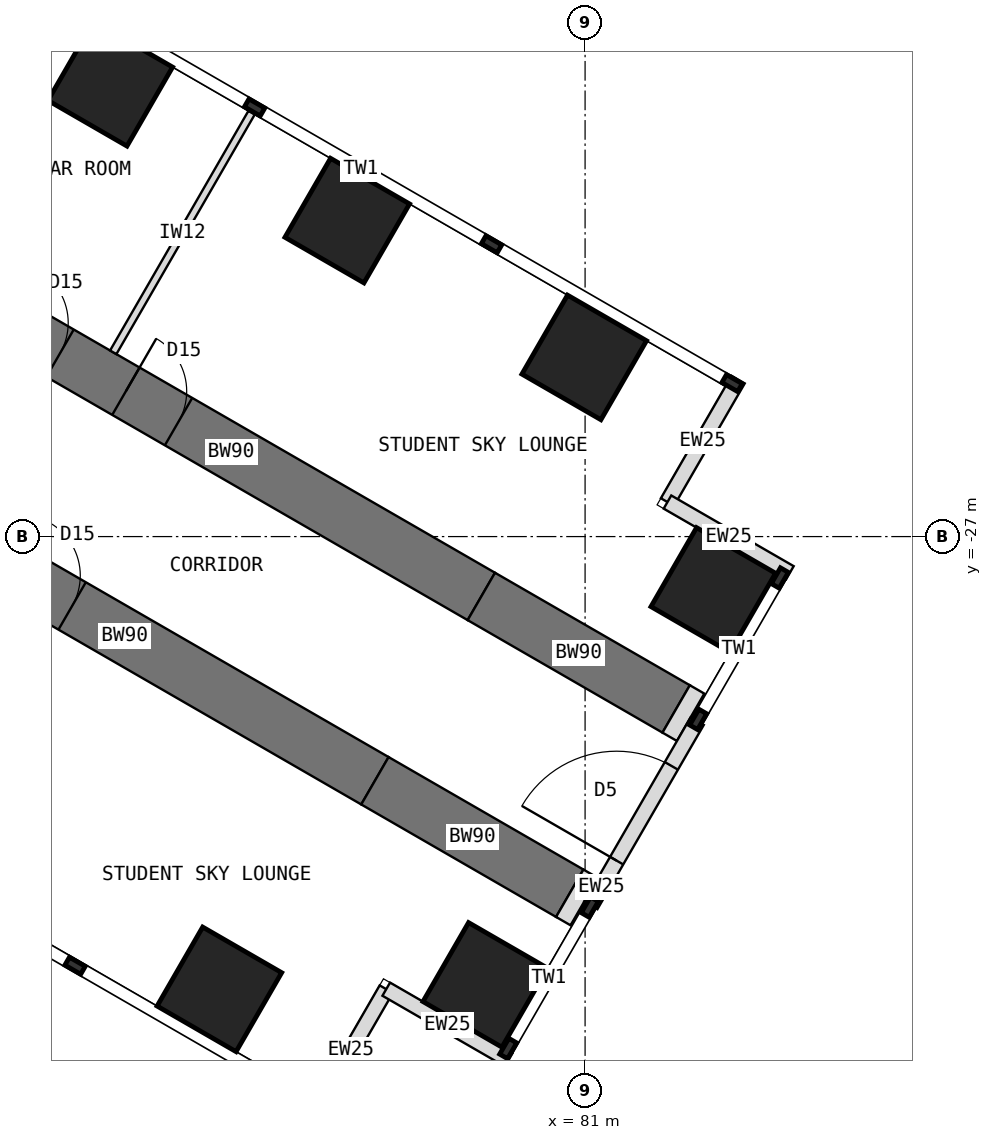
"""IFC4 building model, lengths in metres.
Left out: names, types, materials, properties, quantities, classifications, styles, units other than length and angle.
Written with IfcOpenShell. Run it as: python <this file> out.ifc"""

import sys

from ifc_helpers import new_model, si_unit, direction, frame, frame_2d, origin, origin_2d, place, context, subcontext, project, spatial, rectangle, extrude, element, fill, save


model = new_model("IFC4")
c1 = context("Model", 3, precision=1e-05, world=origin(), true_north=direction((0.0, 1.0)))
c2 = subcontext(c1, "Body", "Model", "MODEL_VIEW")
j1 = project(units=[si_unit("LENGTHUNIT", "METRE"), si_unit("PLANEANGLEUNIT", "RADIAN")], contexts=[c1])
p1 = place(None, origin())
s1 = spatial("IfcSite", under=j1, at=p1, CompositionType="ELEMENT")
p2 = place(p1, origin())
s2 = spatial("IfcBuilding", under=s1, at=p2, CompositionType="ELEMENT")
p3 = place(p2, frame((0.0, 0.0, 20.5)))
s3 = spatial("IfcBuildingStorey", under=s2, at=p3, CompositionType="ELEMENT", Elevation=20.5)
p4 = place(p3, frame((71.066, -23.234, 0.0), z_axis=(0.0, 0.0, 1.0), x_axis=(0.86602681393, -0.499997557548, 0.0)))
e1 = element("IfcWall", 1, at=p4, inside=s3, PredefinedType="SHEAR", context=c2, shape_type="SweptSolid", body=[
    extrude(rectangle(XDim=9.5, YDim=0.9, at=frame_2d((4.75, 0.0))), origin(), (0.0, 0.0, 1.0), 4.0),
])
p5 = place(p4, frame((0.5, 0.0, 0.0)))
e2 = element("IfcOpeningElement", 2, at=p5, cuts=e1, PredefinedType="OPENING", context=c2, shape_type="SweptSolid", body=[
    extrude(rectangle(XDim=1.0, YDim=2.1, at=frame_2d((0.5, 1.05))), frame((0.0, 0.46, 0.0), z_axis=(0.0, -1.0, 0.0), x_axis=(1.0, 0.0, 0.0)), (0.0, 0.0, 1.0), 0.92),
])
p6 = place(p4, frame((2.75, 0.0, 0.0)))
e3 = element("IfcOpeningElement", 3, at=p6, cuts=e1, PredefinedType="OPENING", context=c2, shape_type="SweptSolid", body=[
    extrude(rectangle(XDim=1.0, YDim=2.1, at=frame_2d((0.5, 1.05))), frame((0.0, 0.46, 0.0), z_axis=(0.0, -1.0, 0.0), x_axis=(1.0, 0.0, 0.0)), (0.0, 0.0, 1.0), 0.92),
])
p7 = place(p3, frame((79.294, -27.984, 0.0), z_axis=(0.0, 0.0, 1.0), x_axis=(0.866000971088, -0.500042316284, 0.0)))
e4 = element("IfcWall", 4, at=p7, inside=s3, PredefinedType="SHEAR", context=c2, shape_type="SweptSolid", body=[
    extrude(rectangle(XDim=3.7, YDim=0.9, at=frame_2d((1.85, 0.0))), origin(), (0.0, 0.0, 1.0), 4.0),
])
p8 = place(p3, frame((69.316, -26.266, 0.0), z_axis=(0.0, 0.0, 1.0), x_axis=(0.86602681393, -0.499997557548, 0.0)))
e5 = element("IfcWall", 5, at=p8, inside=s3, PredefinedType="SHEAR", context=c2, shape_type="SweptSolid", body=[
    extrude(rectangle(XDim=9.5, YDim=0.9, at=frame_2d((4.75, 0.0))), origin(), (0.0, 0.0, 1.0), 4.0),
])
p9 = place(p8, frame((0.5, 0.0, 0.0)))
e6 = element("IfcOpeningElement", 6, at=p9, cuts=e5, PredefinedType="OPENING", context=c2, shape_type="SweptSolid", body=[
    extrude(rectangle(XDim=1.0, YDim=2.1, at=frame_2d((0.5, 1.05))), frame((0.0, 0.46, 0.0), z_axis=(0.0, -1.0, 0.0), x_axis=(1.0, 0.0, 0.0)), (0.0, 0.0, 1.0), 0.92),
])
p10 = place(p8, frame((2.75, 0.0, 0.0)))
e7 = element("IfcOpeningElement", 7, at=p10, cuts=e5, PredefinedType="OPENING", context=c2, shape_type="SweptSolid", body=[
    extrude(rectangle(XDim=1.0, YDim=2.1, at=frame_2d((0.5, 1.05))), frame((0.0, 0.46, 0.0), z_axis=(0.0, -1.0, 0.0), x_axis=(1.0, 0.0, 0.0)), (0.0, 0.0, 1.0), 0.92),
])
p11 = place(p3, frame((77.544, -31.016, 0.0), z_axis=(0.0, 0.0, 1.0), x_axis=(0.866029545028, -0.499992827086, 0.0)))
e8 = element("IfcWall", 8, at=p11, inside=s3, PredefinedType="SHEAR", context=c2, shape_type="SweptSolid", body=[
    extrude(rectangle(XDim=3.7, YDim=0.9, at=frame_2d((1.85, 0.0))), origin(), (0.0, 0.0, 1.0), 4.0),
])
for number, where, z_axis, x_axis in (
    (9, (73.191, -19.554, 0.0), (0.0, 0.0, 1.0), (0.5, 0.866, 0.0)),
    (10, (77.088, -21.804, 0.0), (0.0, 0.0, 1.0), (0.5, 0.866, 0.0)),
    (11, (80.986, -24.054, 0.0), (0.0, 0.0, 1.0), (0.5, 0.866, 0.0)),
    (12, (74.986, -34.446, 0.0), (0.0, 0.0, 1.0), (0.5, 0.866, 0.0)),
    (13, (83.108, -27.877, 0.0), (0.0, 0.0, 1.0), (0.5, 0.866, 0.0)),
    (14, (79.358, -34.373, 0.0), (0.0, 0.0, 1.0), (0.5, 0.866, 0.0)),
):
    element("IfcColumn", number, at=place(p3, frame(where, z_axis=z_axis, x_axis=x_axis)), inside=s3, PredefinedType="COLUMN", context=c2, shape_type="SweptSolid", body=[
        extrude(rectangle(XDim=1.5, YDim=1.5, at=origin_2d()), origin(), (0.0, 0.0, 1.0), 4.0),
    ])
for number, where, z_axis, x_axis in (
    (15, (83.517, -24.419, 0.0), (0.0, 0.0, 1.0), (-0.5, -0.866, 0.0)),
    (16, (82.355, -26.432, 0.0), (0.0, 0.0, 1.0), (0.866, -0.5, 0.0)),
    (17, (76.567, -36.456, 0.0), (0.0, 0.0, 1.0), (0.5, 0.866, 0.0)),
    (18, (77.73, -34.443, 0.0), (0.0, 0.0, 1.0), (0.866, -0.5, 0.0)),
):
    element("IfcWall", number, at=place(p3, frame(where, z_axis=z_axis, x_axis=x_axis)), inside=s3, PredefinedType="STANDARD", context=c2, shape_type="SweptSolid", body=[
        extrude(rectangle(XDim=2.325, YDim=0.25, at=frame_2d((1.163, 0.0))), origin(), (0.0, 0.0, 1.0), 3.8),
    ])
p12 = place(p3, frame((81.094, -33.065, 0.0), z_axis=(0.0, 0.0, 1.0), x_axis=(0.500010275428, 0.866019471182, 0.0)))
e19 = element("IfcWall", 19, at=p12, inside=s3, PredefinedType="STANDARD", context=c2, shape_type="SweptSolid", body=[
    extrude(rectangle(XDim=3.5, YDim=0.25, at=frame_2d((1.75, 0.0))), origin(), (0.0, 0.0, 1.0), 3.8),
])
p13 = place(p12, frame((0.85, 0.0, 0.0)))
e20 = element("IfcOpeningElement", 20, at=p13, cuts=e19, PredefinedType="OPENING", context=c2, shape_type="SweptSolid", body=[
    extrude(rectangle(XDim=1.8, YDim=2.4, at=frame_2d((0.9, 1.2))), frame((0.0, 0.135, 0.0), z_axis=(0.0, -1.0, 0.0), x_axis=(1.0, 0.0, 0.0)), (0.0, 0.0, 1.0), 0.27),
])
for number, where, z_axis, x_axis in (
    (21, (82.498, -29.834, 0.0), (0.0, 0.0, 1.0), (0.866, -0.5, 0.0)),
    (22, (80.748, -32.865, 0.0), (0.0, 0.0, 1.0), (0.866, -0.5, 0.0)),
):
    element("IfcWall", number, at=place(p3, frame(where, z_axis=z_axis, x_axis=x_axis)), inside=s3, PredefinedType="PARTITIONING", context=c2, shape_type="SweptSolid", body=[
        extrude(rectangle(XDim=0.275, YDim=0.9, at=frame_2d((0.138, 0.0))), origin(), (0.0, 0.0, 1.0), 3.8),
    ])
p14 = place(p3, frame((73.24, -23.97, 0.0), z_axis=(0.0, 0.0, 1.0), x_axis=(0.499982560684, 0.866035472144, 0.0)))
e23 = element("IfcWall", 23, at=p14, inside=s3, PredefinedType="PARTITIONING", context=c2, shape_type="SweptSolid", body=[
    extrude(rectangle(XDim=4.55, YDim=0.12, at=frame_2d((2.275, 0.0))), origin(), (0.0, 0.0, 1.0), 3.8),
])
p15 = place(p13, origin())
e24 = element("IfcDoor", 24, at=p15, inside=s3, OperationType="DOUBLE_DOOR_DOUBLE_SWING", PredefinedType="DOOR", context=c2, shape_type="SweptSolid", body=[
    extrude(rectangle(XDim=1.8, YDim=2.4, at=frame_2d((0.9, 1.2))), frame((0.0, 0.025, 0.0), z_axis=(0.0, -1.0, 0.0), x_axis=(1.0, 0.0, 0.0)), (0.0, 0.0, 1.0), 0.05),
])
fill(e20, e24)
p16 = place(p5, origin())
e25 = element("IfcDoor", 25, at=p16, inside=s3, OperationType="SINGLE_SWING_LEFT", PredefinedType="DOOR", context=c2, shape_type="SweptSolid", body=[
    extrude(rectangle(XDim=0.92, YDim=2.06, at=frame_2d((0.5, 1.03))), frame((0.0, 0.025, 0.0), z_axis=(0.0, -1.0, 0.0), x_axis=(1.0, 0.0, 0.0)), (0.0, 0.0, 1.0), 0.05),
    extrude(rectangle(XDim=0.04, YDim=2.1, at=frame_2d((0.02, 1.05))), frame((0.0, 0.45, 0.0), z_axis=(0.0, -1.0, 0.0), x_axis=(1.0, 0.0, 0.0)), (0.0, 0.0, 1.0), 0.899),
    extrude(rectangle(XDim=0.04, YDim=2.1, at=frame_2d((0.98, 1.05))), frame((0.0, 0.45, 0.0), z_axis=(0.0, -1.0, 0.0), x_axis=(1.0, 0.0, 0.0)), (0.0, 0.0, 1.0), 0.899),
    extrude(rectangle(XDim=0.92, YDim=0.04, at=frame_2d((0.5, 2.08))), frame((0.0, 0.45, 0.0), z_axis=(0.0, -1.0, 0.0), x_axis=(1.0, 0.0, 0.0)), (0.0, 0.0, 1.0), 0.899),
])
fill(e2, e25)
p17 = place(p6, origin())
e26 = element("IfcDoor", 26, at=p17, inside=s3, OperationType="SINGLE_SWING_LEFT", PredefinedType="DOOR", context=c2, shape_type="SweptSolid", body=[
    extrude(rectangle(XDim=0.92, YDim=2.06, at=frame_2d((0.5, 1.03))), frame((0.0, 0.025, 0.0), z_axis=(0.0, -1.0, 0.0), x_axis=(1.0, 0.0, 0.0)), (0.0, 0.0, 1.0), 0.05),
    extrude(rectangle(XDim=0.04, YDim=2.1, at=frame_2d((0.02, 1.05))), frame((0.0, 0.45, 0.0), z_axis=(0.0, -1.0, 0.0), x_axis=(1.0, 0.0, 0.0)), (0.0, 0.0, 1.0), 0.899),
    extrude(rectangle(XDim=0.04, YDim=2.1, at=frame_2d((0.98, 1.05))), frame((0.0, 0.45, 0.0), z_axis=(0.0, -1.0, 0.0), x_axis=(1.0, 0.0, 0.0)), (0.0, 0.0, 1.0), 0.899),
    extrude(rectangle(XDim=0.92, YDim=0.04, at=frame_2d((0.5, 2.08))), frame((0.0, 0.45, 0.0), z_axis=(0.0, -1.0, 0.0), x_axis=(1.0, 0.0, 0.0)), (0.0, 0.0, 1.0), 0.899),
])
fill(e3, e26)
p18 = place(p10, origin())
e27 = element("IfcDoor", 27, at=p18, inside=s3, OperationType="SINGLE_SWING_LEFT", PredefinedType="DOOR", context=c2, shape_type="SweptSolid", body=[
    extrude(rectangle(XDim=0.92, YDim=2.06, at=frame_2d((0.5, 1.03))), frame((0.0, 0.025, 0.0), z_axis=(0.0, -1.0, 0.0), x_axis=(1.0, 0.0, 0.0)), (0.0, 0.0, 1.0), 0.05),
    extrude(rectangle(XDim=0.04, YDim=2.1, at=frame_2d((0.02, 1.05))), frame((0.0, 0.45, 0.0), z_axis=(0.0, -1.0, 0.0), x_axis=(1.0, 0.0, 0.0)), (0.0, 0.0, 1.0), 0.899),
    extrude(rectangle(XDim=0.04, YDim=2.1, at=frame_2d((0.98, 1.05))), frame((0.0, 0.45, 0.0), z_axis=(0.0, -1.0, 0.0), x_axis=(1.0, 0.0, 0.0)), (0.0, 0.0, 1.0), 0.899),
    extrude(rectangle(XDim=0.92, YDim=0.04, at=frame_2d((0.5, 2.08))), frame((0.0, 0.45, 0.0), z_axis=(0.0, -1.0, 0.0), x_axis=(1.0, 0.0, 0.0)), (0.0, 0.0, 1.0), 0.899),
])
fill(e7, e27)
save(model, sys.argv[1])
